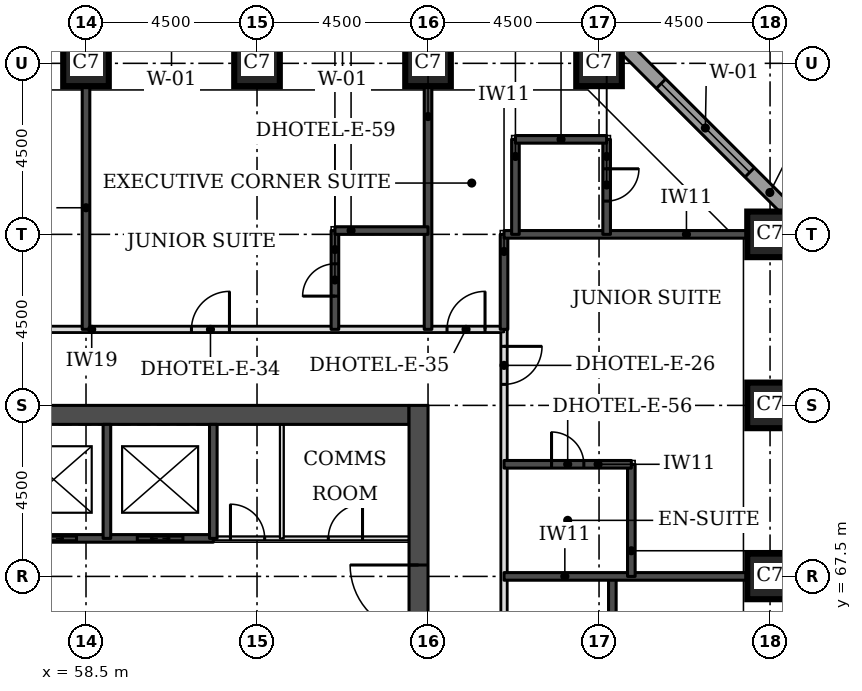
"""IFC4 building model, lengths in metres.
Left out: names, types, materials, properties, quantities, classifications, styles, units other than length and angle.
Written with IfcOpenShell. Run it as: python <this file> out.ifc"""

import sys

from ifc_helpers import new_model, si_unit, direction, frame, frame_2d, origin, origin_2d, place, context, subcontext, project, spatial, rectangle, extrude, element, fill, save


model = new_model("IFC4")
c1 = context("Model", 3, precision=1e-05, world=origin(), true_north=direction((0.0, 1.0)))
c2 = subcontext(c1, "Body", "Model", "MODEL_VIEW")
j1 = project(units=[si_unit("LENGTHUNIT", "METRE"), si_unit("PLANEANGLEUNIT", "RADIAN")], contexts=[c1])
p1 = place(None, origin())
s1 = spatial("IfcSite", under=j1, at=p1, CompositionType="ELEMENT")
p2 = place(p1, origin())
s2 = spatial("IfcBuilding", under=s1, at=p2, CompositionType="ELEMENT")
p3 = place(p2, frame((0.0, 0.0, 39.6)))
s3 = spatial("IfcBuildingStorey", under=s2, at=p3, CompositionType="ELEMENT", Elevation=39.6)
for number, where, z_axis, x_axis in (
    (1, (76.5, 67.5, 0.0), (0.0, 0.0, 1.0), (1.0, 0.0, 0.0)),
    (2, (76.5, 72.0, 0.0), (0.0, 0.0, 1.0), (1.0, 0.0, 0.0)),
    (3, (76.5, 76.5, 0.0), (0.0, 0.0, 1.0), (1.0, 0.0, 0.0)),
    (4, (58.5, 81.0, 0.0), (0.0, 0.0, 1.0), (1.0, 0.0, 0.0)),
    (5, (63.0, 81.0, 0.0), (0.0, 0.0, 1.0), (1.0, 0.0, 0.0)),
    (6, (67.5, 81.0, 0.0), (0.0, 0.0, 1.0), (1.0, 0.0, 0.0)),
    (7, (72.0, 81.0, 0.0), (0.0, 0.0, 1.0), (1.0, 0.0, 0.0)),
):
    element("IfcColumn", number, at=place(p3, frame(where, z_axis=z_axis, x_axis=x_axis)), inside=s3, PredefinedType="COLUMN", context=c2, shape_type="SweptSolid", body=[
        extrude(rectangle(XDim=1.2, YDim=1.2, at=origin_2d()), origin(), (0.0, 0.0, 1.0), 3.3),
    ])
p4 = place(p3, frame((45.5, 71.75, 0.0), z_axis=(0.0, 0.0, 1.0), x_axis=(1.0, 0.0, 0.0)))
e8 = element("IfcWall", 8, at=p4, inside=s3, PredefinedType="SHEAR", context=c2, shape_type="SweptSolid", body=[
    extrude(rectangle(XDim=21.5, YDim=0.5, at=frame_2d((10.75, 0.0))), origin(), (0.0, 0.0, 1.0), 3.3),
])
p5 = place(p3, frame((67.25, 49.5, 0.0), z_axis=(0.0, 0.0, 1.0), x_axis=(0.0, 1.0, 0.0)))
e9 = element("IfcWall", 9, at=p5, inside=s3, PredefinedType="SHEAR", context=c2, shape_type="SweptSolid", body=[
    extrude(rectangle(XDim=22.5, YDim=0.5, at=frame_2d((11.25, 0.0))), origin(), (0.0, 0.0, 1.0), 3.3),
])
p6 = place(p5, frame((4.2, 0.0, 0.0)))
e10 = element("IfcOpeningElement", 10, at=p6, cuts=e9, PredefinedType="OPENING", context=c2, shape_type="SweptSolid", body=[
    extrude(rectangle(XDim=1.8, YDim=2.1, at=frame_2d((0.9, 1.05))), frame((0.0, 0.26, 0.0), z_axis=(0.0, -1.0, 0.0), x_axis=(1.0, 0.0, 0.0)), (0.0, 0.0, 1.0), 0.52),
])
p7 = place(p5, frame((6.9, 0.0, 0.0)))
e11 = element("IfcOpeningElement", 11, at=p7, cuts=e9, PredefinedType="OPENING", context=c2, shape_type="SweptSolid", body=[
    extrude(rectangle(XDim=1.1, YDim=2.1, at=frame_2d((0.55, 1.05))), frame((0.0, 0.26, 0.0), z_axis=(0.0, -1.0, 0.0), x_axis=(1.0, 0.0, 0.0)), (0.0, 0.0, 1.0), 0.52),
])
p8 = place(p5, frame((13.6, 0.0, 0.0)))
e12 = element("IfcOpeningElement", 12, at=p8, cuts=e9, PredefinedType="OPENING", context=c2, shape_type="SweptSolid", body=[
    extrude(rectangle(XDim=1.1, YDim=2.1, at=frame_2d((0.55, 1.05))), frame((0.0, 0.26, 0.0), z_axis=(0.0, -1.0, 0.0), x_axis=(1.0, 0.0, 0.0)), (0.0, 0.0, 1.0), 0.52),
])
p9 = place(p5, frame((16.5, 0.0, 0.0)))
e13 = element("IfcOpeningElement", 13, at=p9, cuts=e9, PredefinedType="OPENING", context=c2, shape_type="SweptSolid", body=[
    extrude(rectangle(XDim=1.8, YDim=2.1, at=frame_2d((0.9, 1.05))), frame((0.0, 0.26, 0.0), z_axis=(0.0, -1.0, 0.0), x_axis=(1.0, 0.0, 0.0)), (0.0, 0.0, 1.0), 0.52),
])
p10 = place(p3, frame((77.326, 76.77, 0.0), z_axis=(0.0, 0.0, 1.0), x_axis=(-0.707106781187, 0.707106781187, 0.0)))
e14 = element("IfcWall", 14, at=p10, inside=s3, PredefinedType="STANDARD", context=c2, shape_type="SweptSolid", body=[
    extrude(rectangle(XDim=7.151, YDim=0.35, at=frame_2d((3.576, 0.0))), origin(), (0.0, 0.0, 1.0), 3.055),
])
p11 = place(p10, frame((1.926, 0.0, 0.8)))
e15 = element("IfcOpeningElement", 15, at=p11, cuts=e14, PredefinedType="OPENING", context=c2, shape_type="SweptSolid", body=[
    extrude(rectangle(XDim=3.3, YDim=1.5, at=frame_2d((1.65, 0.75))), frame((0.0, 0.185, 0.0), z_axis=(0.0, -1.0, 0.0), x_axis=(1.0, 0.0, 0.0)), (0.0, 0.0, 1.0), 0.37),
])
p12 = place(p3, frame((69.5, 47.5, 0.0), z_axis=(0.0, 0.0, 1.0), x_axis=(0.0, 1.0, 0.0)))
e16 = element("IfcWall", 16, at=p12, inside=s3, PredefinedType="PARTITIONING", context=c2, shape_type="SweptSolid", body=[
    extrude(rectangle(XDim=26.5, YDim=0.15, at=frame_2d((13.25, 0.0))), origin(), (0.0, 0.0, 1.0), 3.08),
])
p13 = place(p12, frame((25.053, 0.0, 0.0)))
e17 = element("IfcOpeningElement", 17, at=p13, cuts=e16, PredefinedType="OPENING", context=c2, shape_type="SweptSolid", body=[
    extrude(rectangle(XDim=1.0, YDim=2.1, at=frame_2d((0.5, 1.05))), frame((0.0, 0.085, 0.0), z_axis=(0.0, -1.0, 0.0), x_axis=(1.0, 0.0, 0.0)), (0.0, 0.0, 1.0), 0.17),
])
p14 = place(p12, frame((13.775, 0.0, 0.0)))
e18 = element("IfcOpeningElement", 18, at=p14, cuts=e16, PredefinedType="OPENING", context=c2, shape_type="SweptSolid", body=[
    extrude(rectangle(XDim=1.0, YDim=2.1, at=frame_2d((0.5, 1.05))), frame((0.0, 0.085, 0.0), z_axis=(0.0, -1.0, 0.0), x_axis=(1.0, 0.0, 0.0)), (0.0, 0.0, 1.0), 0.17),
])
p15 = place(p12, frame((7.65, 0.0, 0.0)))
e19 = element("IfcOpeningElement", 19, at=p15, cuts=e16, PredefinedType="OPENING", context=c2, shape_type="SweptSolid", body=[
    extrude(rectangle(XDim=1.1, YDim=2.1, at=frame_2d((0.55, 1.05))), frame((0.0, 0.085, 0.0), z_axis=(0.0, -1.0, 0.0), x_axis=(1.0, 0.0, 0.0)), (0.0, 0.0, 1.0), 0.17),
])
p16 = place(p12, frame((0.447, 0.0, 0.0)))
e20 = element("IfcOpeningElement", 20, at=p16, cuts=e16, PredefinedType="OPENING", context=c2, shape_type="SweptSolid", body=[
    extrude(rectangle(XDim=1.0, YDim=2.1, at=frame_2d((0.5, 1.05))), frame((0.0, 0.085, 0.0), z_axis=(0.0, -1.0, 0.0), x_axis=(1.0, 0.0, 0.0)), (0.0, 0.0, 1.0), 0.17),
])
p17 = place(p3, frame((43.0, 74.0, 0.0), z_axis=(0.0, 0.0, 1.0), x_axis=(1.0, 0.0, 0.0)))
e21 = element("IfcWall", 21, at=p17, inside=s3, PredefinedType="PARTITIONING", context=c2, shape_type="SweptSolid", body=[
    extrude(rectangle(XDim=26.5, YDim=0.15, at=frame_2d((13.25, 0.0))), origin(), (0.0, 0.0, 1.0), 3.08),
])
p18 = place(p17, frame((2.825, 0.0, 0.0)))
e22 = element("IfcOpeningElement", 22, at=p18, cuts=e21, PredefinedType="OPENING", context=c2, shape_type="SweptSolid", body=[
    extrude(rectangle(XDim=1.0, YDim=2.1, at=frame_2d((0.5, 1.05))), frame((0.0, 0.085, 0.0), z_axis=(0.0, -1.0, 0.0), x_axis=(1.0, 0.0, 0.0)), (0.0, 0.0, 1.0), 0.17),
])
p19 = place(p17, frame((11.975, 0.0, 0.0)))
e23 = element("IfcOpeningElement", 23, at=p19, cuts=e21, PredefinedType="OPENING", context=c2, shape_type="SweptSolid", body=[
    extrude(rectangle(XDim=1.0, YDim=2.1, at=frame_2d((0.5, 1.05))), frame((0.0, 0.085, 0.0), z_axis=(0.0, -1.0, 0.0), x_axis=(1.0, 0.0, 0.0)), (0.0, 0.0, 1.0), 0.17),
])
p20 = place(p17, frame((18.275, 0.0, 0.0)))
e24 = element("IfcOpeningElement", 24, at=p20, cuts=e21, PredefinedType="OPENING", context=c2, shape_type="SweptSolid", body=[
    extrude(rectangle(XDim=1.0, YDim=2.1, at=frame_2d((0.5, 1.05))), frame((0.0, 0.085, 0.0), z_axis=(0.0, -1.0, 0.0), x_axis=(1.0, 0.0, 0.0)), (0.0, 0.0, 1.0), 0.17),
])
p21 = place(p17, frame((0.5, 0.0, 0.0)))
e25 = element("IfcOpeningElement", 25, at=p21, cuts=e21, PredefinedType="OPENING", context=c2, shape_type="SweptSolid", body=[
    extrude(rectangle(XDim=1.0, YDim=2.1, at=frame_2d((0.5, 1.05))), frame((0.0, 0.085, 0.0), z_axis=(0.0, -1.0, 0.0), x_axis=(1.0, 0.0, 0.0)), (0.0, 0.0, 1.0), 0.17),
])
p22 = place(p17, frame((25.0, 0.0, 0.0)))
e26 = element("IfcOpeningElement", 26, at=p22, cuts=e21, PredefinedType="OPENING", context=c2, shape_type="SweptSolid", body=[
    extrude(rectangle(XDim=1.0, YDim=2.1, at=frame_2d((0.5, 1.05))), frame((0.0, 0.085, 0.0), z_axis=(0.0, -1.0, 0.0), x_axis=(1.0, 0.0, 0.0)), (0.0, 0.0, 1.0), 0.17),
])
p23 = place(p3, frame((72.35, 65.05, 0.0), z_axis=(0.0, 0.0, 1.0), x_axis=(0.0, 1.0, 0.0)))
e27 = element("IfcWall", 27, at=p23, inside=s3, PredefinedType="SOLIDWALL", context=c2, shape_type="SweptSolid", body=[
    extrude(rectangle(XDim=2.45, YDim=0.2, at=frame_2d((1.225, 0.0))), origin(), (0.0, 0.0, 1.0), 3.08),
])
p24 = place(p3, frame((69.5, 67.5, 0.0), z_axis=(0.0, 0.0, 1.0), x_axis=(1.0, 0.0, 0.0)))
e28 = element("IfcWall", 28, at=p24, inside=s3, PredefinedType="SOLIDWALL", context=c2, shape_type="SweptSolid", body=[
    extrude(rectangle(XDim=6.4, YDim=0.2, at=frame_2d((3.2, 0.0))), origin(), (0.0, 0.0, 1.0), 3.08),
])
p25 = place(p3, frame((72.85, 67.5, 0.0), z_axis=(0.0, 0.0, 1.0), x_axis=(0.0, 1.0, 0.0)))
e29 = element("IfcWall", 29, at=p25, inside=s3, PredefinedType="SOLIDWALL", context=c2, shape_type="SweptSolid", body=[
    extrude(rectangle(XDim=2.95, YDim=0.2, at=frame_2d((1.475, 0.0))), origin(), (0.0, 0.0, 1.0), 3.08),
])
p26 = place(p3, frame((69.5, 70.45, 0.0), z_axis=(0.0, 0.0, 1.0), x_axis=(1.0, 0.0, 0.0)))
e30 = element("IfcWall", 30, at=p26, inside=s3, PredefinedType="SOLIDWALL", context=c2, shape_type="SweptSolid", body=[
    extrude(rectangle(XDim=3.35, YDim=0.2, at=frame_2d((1.675, 0.0))), origin(), (0.0, 0.0, 1.0), 3.08),
])
p27 = place(p26, frame((1.25, 0.0, 0.0)))
e31 = element("IfcOpeningElement", 31, at=p27, cuts=e30, PredefinedType="OPENING", context=c2, shape_type="SweptSolid", body=[
    extrude(rectangle(XDim=0.85, YDim=2.1, at=frame_2d((0.425, 1.05))), frame((0.0, 0.11, 0.0), z_axis=(0.0, -1.0, 0.0), x_axis=(1.0, 0.0, 0.0)), (0.0, 0.0, 1.0), 0.22),
])
p28 = place(p3, frame((58.5, 74.0, 0.0), z_axis=(0.0, 0.0, 1.0), x_axis=(0.0, 1.0, 0.0)))
e32 = element("IfcWall", 32, at=p28, inside=s3, PredefinedType="SOLIDWALL", context=c2, shape_type="SweptSolid", body=[
    extrude(rectangle(XDim=6.4, YDim=0.2, at=frame_2d((3.2, 0.0))), origin(), (0.0, 0.0, 1.0), 3.08),
])
p29 = place(p3, frame((65.05, 74.0, 0.0), z_axis=(0.0, 0.0, 1.0), x_axis=(0.0, 1.0, 0.0)))
e33 = element("IfcWall", 33, at=p29, inside=s3, PredefinedType="SOLIDWALL", context=c2, shape_type="SweptSolid", body=[
    extrude(rectangle(XDim=2.6, YDim=0.2, at=frame_2d((1.3, 0.0))), origin(), (0.0, 0.0, 1.0), 3.08),
])
p30 = place(p29, frame((0.875, 0.0, 0.0)))
e34 = element("IfcOpeningElement", 34, at=p30, cuts=e33, PredefinedType="OPENING", context=c2, shape_type="SweptSolid", body=[
    extrude(rectangle(XDim=0.85, YDim=2.1, at=frame_2d((0.425, 1.05))), frame((0.0, 0.11, 0.0), z_axis=(0.0, -1.0, 0.0), x_axis=(1.0, 0.0, 0.0)), (0.0, 0.0, 1.0), 0.22),
])
p31 = place(p3, frame((67.5, 74.0, 0.0), z_axis=(0.0, 0.0, 1.0), x_axis=(0.0, 1.0, 0.0)))
e35 = element("IfcWall", 35, at=p31, inside=s3, PredefinedType="SOLIDWALL", context=c2, shape_type="SweptSolid", body=[
    extrude(rectangle(XDim=6.4, YDim=0.2, at=frame_2d((3.2, 0.0))), origin(), (0.0, 0.0, 1.0), 3.08),
])
p32 = place(p3, frame((69.5, 74.0, 0.0), z_axis=(0.0, 0.0, 1.0), x_axis=(0.0, 1.0, 0.0)))
e36 = element("IfcWall", 36, at=p32, inside=s3, PredefinedType="SOLIDWALL", context=c2, shape_type="SweptSolid", body=[
    extrude(rectangle(XDim=2.5, YDim=0.2, at=frame_2d((1.25, 0.0))), origin(), (0.0, 0.0, 1.0), 3.08),
])
p33 = place(p3, frame((69.5, 76.5, 0.0), z_axis=(0.0, 0.0, 1.0), x_axis=(1.0, 0.0, 0.0)))
e37 = element("IfcWall", 37, at=p33, inside=s3, PredefinedType="SOLIDWALL", context=c2, shape_type="SweptSolid", body=[
    extrude(rectangle(XDim=6.4, YDim=0.2, at=frame_2d((3.2, 0.0))), origin(), (0.0, 0.0, 1.0), 3.08),
])
p34 = place(p3, frame((69.8, 76.5, 0.0), z_axis=(0.0, 0.0, 1.0), x_axis=(0.0, 1.0, 0.0)))
e38 = element("IfcWall", 38, at=p34, inside=s3, PredefinedType="SOLIDWALL", context=c2, shape_type="SweptSolid", body=[
    extrude(rectangle(XDim=2.5, YDim=0.2, at=frame_2d((1.25, 0.0))), origin(), (0.0, 0.0, 1.0), 3.08),
])
p35 = place(p3, frame((72.2, 76.5, 0.0), z_axis=(0.0, 0.0, 1.0), x_axis=(0.0, 1.0, 0.0)))
e39 = element("IfcWall", 39, at=p35, inside=s3, PredefinedType="SOLIDWALL", context=c2, shape_type="SweptSolid", body=[
    extrude(rectangle(XDim=2.5, YDim=0.2, at=frame_2d((1.25, 0.0))), origin(), (0.0, 0.0, 1.0), 3.08),
])
p36 = place(p35, frame((0.875, 0.0, 0.0)))
e40 = element("IfcOpeningElement", 40, at=p36, cuts=e39, PredefinedType="OPENING", context=c2, shape_type="SweptSolid", body=[
    extrude(rectangle(XDim=0.85, YDim=2.1, at=frame_2d((0.425, 1.05))), frame((0.0, 0.11, 0.0), z_axis=(0.0, -1.0, 0.0), x_axis=(1.0, 0.0, 0.0)), (0.0, 0.0, 1.0), 0.22),
])
p37 = place(p3, frame((65.05, 76.6, 0.0), z_axis=(0.0, 0.0, 1.0), x_axis=(1.0, 0.0, 0.0)))
e41 = element("IfcWall", 41, at=p37, inside=s3, PredefinedType="SOLIDWALL", context=c2, shape_type="SweptSolid", body=[
    extrude(rectangle(XDim=2.45, YDim=0.2, at=frame_2d((1.225, 0.0))), origin(), (0.0, 0.0, 1.0), 3.08),
])
p38 = place(p3, frame((69.8, 79.0, 0.0), z_axis=(0.0, 0.0, 1.0), x_axis=(1.0, 0.0, 0.0)))
e42 = element("IfcWall", 42, at=p38, inside=s3, PredefinedType="SOLIDWALL", context=c2, shape_type="SweptSolid", body=[
    extrude(rectangle(XDim=2.4, YDim=0.2, at=frame_2d((1.2, 0.0))), origin(), (0.0, 0.0, 1.0), 3.08),
])
p39 = place(p3, frame((61.85, 68.5, 0.0), z_axis=(0.0, 0.0, 1.0), x_axis=(1.0, 0.0, 0.0)))
e43 = element("IfcWall", 43, at=p39, inside=s3, PredefinedType="PARTITIONING", context=c2, shape_type="SweptSolid", body=[
    extrude(rectangle(XDim=5.15, YDim=0.1, at=frame_2d((2.575, 0.0))), origin(), (0.0, 0.0, 1.0), 3.08),
])
p40 = place(p39, frame((3.026, 0.0, 0.0)))
e44 = element("IfcOpeningElement", 44, at=p40, cuts=e43, PredefinedType="OPENING", context=c2, shape_type="SweptSolid", body=[
    extrude(rectangle(XDim=0.9, YDim=2.1, at=frame_2d((0.45, 1.05))), frame((0.0, 0.06, 0.0), z_axis=(0.0, -1.0, 0.0), x_axis=(1.0, 0.0, 0.0)), (0.0, 0.0, 1.0), 0.12),
])
p41 = place(p39, frame((0.451, 0.0, 0.0)))
e45 = element("IfcOpeningElement", 45, at=p41, cuts=e43, PredefinedType="OPENING", context=c2, shape_type="SweptSolid", body=[
    extrude(rectangle(XDim=0.9, YDim=2.1, at=frame_2d((0.45, 1.05))), frame((0.0, 0.06, 0.0), z_axis=(0.0, -1.0, 0.0), x_axis=(1.0, 0.0, 0.0)), (0.0, 0.0, 1.0), 0.12),
])
p42 = place(p3, frame((50.65, 68.5, 0.0), z_axis=(0.0, 0.0, 1.0), x_axis=(1.0, 0.0, 0.0)))
e46 = element("IfcWall", 46, at=p42, inside=s3, PredefinedType="SOLIDWALL", context=c2, shape_type="SweptSolid", body=[
    extrude(rectangle(XDim=11.2, YDim=0.2, at=frame_2d((5.6, 0.0))), origin(), (0.0, 0.0, 1.0), 3.08),
])
p43 = place(p42, frame((0.8, 0.0, 0.0)))
e47 = element("IfcOpeningElement", 47, at=p43, cuts=e46, PredefinedType="OPENING", context=c2, shape_type="SweptSolid", body=[
    extrude(rectangle(XDim=1.2, YDim=2.1, at=frame_2d((0.6, 1.05))), frame((0.0, 0.11, 0.0), z_axis=(0.0, -1.0, 0.0), x_axis=(1.0, 0.0, 0.0)), (0.0, 0.0, 1.0), 0.22),
])
p44 = place(p42, frame((3.6, 0.0, 0.0)))
e48 = element("IfcOpeningElement", 48, at=p44, cuts=e46, PredefinedType="OPENING", context=c2, shape_type="SweptSolid", body=[
    extrude(rectangle(XDim=1.2, YDim=2.1, at=frame_2d((0.6, 1.05))), frame((0.0, 0.11, 0.0), z_axis=(0.0, -1.0, 0.0), x_axis=(1.0, 0.0, 0.0)), (0.0, 0.0, 1.0), 0.22),
])
p45 = place(p42, frame((6.4, 0.0, 0.0)))
e49 = element("IfcOpeningElement", 49, at=p45, cuts=e46, PredefinedType="OPENING", context=c2, shape_type="SweptSolid", body=[
    extrude(rectangle(XDim=1.2, YDim=2.1, at=frame_2d((0.6, 1.05))), frame((0.0, 0.11, 0.0), z_axis=(0.0, -1.0, 0.0), x_axis=(1.0, 0.0, 0.0)), (0.0, 0.0, 1.0), 0.22),
])
p46 = place(p42, frame((9.2, 0.0, 0.0)))
e50 = element("IfcOpeningElement", 50, at=p46, cuts=e46, PredefinedType="OPENING", context=c2, shape_type="SweptSolid", body=[
    extrude(rectangle(XDim=1.2, YDim=2.1, at=frame_2d((0.6, 1.05))), frame((0.0, 0.11, 0.0), z_axis=(0.0, -1.0, 0.0), x_axis=(1.0, 0.0, 0.0)), (0.0, 0.0, 1.0), 0.22),
])
for number, where, z_axis, x_axis in (
    (51, (59.05, 68.5, 0.0), (0.0, 0.0, 1.0), (0.0, 1.0, 0.0)),
    (52, (61.85, 68.5, 0.0), (0.0, 0.0, 1.0), (0.0, 1.0, 0.0)),
):
    element("IfcWall", number, at=place(p3, frame(where, z_axis=z_axis, x_axis=x_axis)), inside=s3, PredefinedType="SOLIDWALL", context=c2, shape_type="SweptSolid", body=[
        extrude(rectangle(XDim=3.0, YDim=0.2, at=frame_2d((1.5, 0.0))), origin(), (0.0, 0.0, 1.0), 3.08),
    ])
p47 = place(p3, frame((63.653, 68.5, 0.0), z_axis=(0.0, 0.0, 1.0), x_axis=(0.0, 1.0, 0.0)))
e53 = element("IfcWall", 53, at=p47, inside=s3, PredefinedType="PARTITIONING", context=c2, shape_type="SweptSolid", body=[
    extrude(rectangle(XDim=3.0, YDim=0.1, at=frame_2d((1.5, 0.0))), origin(), (0.0, 0.0, 1.0), 3.08),
])
p48 = place(p11, origin())
e54 = element("IfcWindow", 54, at=p48, inside=s3, PartitioningType="SINGLE_PANEL", PredefinedType="WINDOW", context=c2, shape_type="SweptSolid", body=[
    extrude(rectangle(XDim=3.3, YDim=1.5, at=frame_2d((1.65, 0.75))), frame((0.0, 0.085, 0.0), z_axis=(0.0, -1.0, 0.0), x_axis=(1.0, 0.0, 0.0)), (0.0, 0.0, 1.0), 0.06),
])
fill(e15, e54)
p49 = place(p20, origin())
e55 = element("IfcDoor", 55, at=p49, inside=s3, OperationType="SINGLE_SWING_RIGHT", PredefinedType="DOOR", context=c2, shape_type="SweptSolid", body=[
    extrude(rectangle(XDim=1.0, YDim=2.1, at=frame_2d((0.5, 1.05))), frame((0.0, 0.025, 0.0), z_axis=(0.0, -1.0, 0.0), x_axis=(1.0, 0.0, 0.0)), (0.0, 0.0, 1.0), 0.05),
])
fill(e24, e55)
p50 = place(p30, origin())
e56 = element("IfcDoor", 56, at=p50, inside=s3, OperationType="SINGLE_SWING_LEFT", PredefinedType="DOOR", context=c2, shape_type="SweptSolid", body=[
    extrude(rectangle(XDim=0.85, YDim=2.1, at=frame_2d((0.425, 1.05))), frame((0.0, 0.025, 0.0), z_axis=(0.0, -1.0, 0.0), x_axis=(1.0, 0.0, 0.0)), (0.0, 0.0, 1.0), 0.05),
])
fill(e34, e56)
p51 = place(p13, frame((1.0, 0.0, 0.0), z_axis=(0.0, 0.0, 1.0), x_axis=(-1.0, 0.0, 0.0)))
e57 = element("IfcDoor", 57, at=p51, inside=s3, OperationType="SINGLE_SWING_LEFT", PredefinedType="DOOR", context=c2, shape_type="SweptSolid", body=[
    extrude(rectangle(XDim=1.0, YDim=2.1, at=frame_2d((0.5, 1.05))), frame((0.0, 0.025, 0.0), z_axis=(0.0, -1.0, 0.0), x_axis=(1.0, 0.0, 0.0)), (0.0, 0.0, 1.0), 0.05),
])
fill(e17, e57)
p52 = place(p27, origin())
e58 = element("IfcDoor", 58, at=p52, inside=s3, OperationType="SINGLE_SWING_LEFT", PredefinedType="DOOR", context=c2, shape_type="SweptSolid", body=[
    extrude(rectangle(XDim=0.85, YDim=2.1, at=frame_2d((0.425, 1.05))), frame((0.0, 0.025, 0.0), z_axis=(0.0, -1.0, 0.0), x_axis=(1.0, 0.0, 0.0)), (0.0, 0.0, 1.0), 0.05),
])
fill(e31, e58)
p53 = place(p22, origin())
e59 = element("IfcDoor", 59, at=p53, inside=s3, OperationType="SINGLE_SWING_RIGHT", PredefinedType="DOOR", context=c2, shape_type="SweptSolid", body=[
    extrude(rectangle(XDim=1.0, YDim=2.1, at=frame_2d((0.5, 1.05))), frame((0.0, 0.025, 0.0), z_axis=(0.0, -1.0, 0.0), x_axis=(1.0, 0.0, 0.0)), (0.0, 0.0, 1.0), 0.05),
])
fill(e26, e59)
p54 = place(p36, frame((0.85, 0.0, 0.0), z_axis=(0.0, 0.0, 1.0), x_axis=(-1.0, 0.0, 0.0)))
e60 = element("IfcDoor", 60, at=p54, inside=s3, OperationType="SINGLE_SWING_LEFT", PredefinedType="DOOR", context=c2, shape_type="SweptSolid", body=[
    extrude(rectangle(XDim=0.85, YDim=2.1, at=frame_2d((0.425, 1.05))), frame((0.0, 0.025, 0.0), z_axis=(0.0, -1.0, 0.0), x_axis=(1.0, 0.0, 0.0)), (0.0, 0.0, 1.0), 0.05),
])
fill(e40, e60)
p55 = place(p45, origin())
e61 = element("IfcDoor", 61, at=p55, inside=s3, OperationType="DOUBLE_DOOR_SLIDING", PredefinedType="DOOR", context=c2, shape_type="SweptSolid", body=[
    extrude(rectangle(XDim=1.2, YDim=2.1, at=frame_2d((0.6, 1.05))), frame((0.0, 0.025, 0.0), z_axis=(0.0, -1.0, 0.0), x_axis=(1.0, 0.0, 0.0)), (0.0, 0.0, 1.0), 0.05),
])
fill(e49, e61)
p56 = place(p46, origin())
e62 = element("IfcDoor", 62, at=p56, inside=s3, OperationType="DOUBLE_DOOR_SLIDING", PredefinedType="DOOR", context=c2, shape_type="SweptSolid", body=[
    extrude(rectangle(XDim=1.2, YDim=2.1, at=frame_2d((0.6, 1.05))), frame((0.0, 0.025, 0.0), z_axis=(0.0, -1.0, 0.0), x_axis=(1.0, 0.0, 0.0)), (0.0, 0.0, 1.0), 0.05),
])
fill(e50, e62)
p57 = place(p9, origin())
e63 = element("IfcDoor", 63, at=p57, inside=s3, OperationType="SINGLE_SWING_RIGHT", PredefinedType="DOOR", context=c2, shape_type="SweptSolid", body=[
    extrude(rectangle(XDim=1.8, YDim=2.1, at=frame_2d((0.9, 1.05))), frame((0.0, 0.025, 0.0), z_axis=(0.0, -1.0, 0.0), x_axis=(1.0, 0.0, 0.0)), (0.0, 0.0, 1.0), 0.05),
])
fill(e13, e63)
p58 = place(p40, origin())
e64 = element("IfcDoor", 64, at=p58, inside=s3, OperationType="SINGLE_SWING_RIGHT", PredefinedType="DOOR", context=c2, shape_type="SweptSolid", body=[
    extrude(rectangle(XDim=0.9, YDim=2.1, at=frame_2d((0.45, 1.05))), frame((0.0, 0.025, 0.0), z_axis=(0.0, -1.0, 0.0), x_axis=(1.0, 0.0, 0.0)), (0.0, 0.0, 1.0), 0.05),
])
fill(e44, e64)
p59 = place(p41, origin())
e65 = element("IfcDoor", 65, at=p59, inside=s3, OperationType="SINGLE_SWING_LEFT", PredefinedType="DOOR", context=c2, shape_type="SweptSolid", body=[
    extrude(rectangle(XDim=0.9, YDim=2.1, at=frame_2d((0.45, 1.05))), frame((0.0, 0.025, 0.0), z_axis=(0.0, -1.0, 0.0), x_axis=(1.0, 0.0, 0.0)), (0.0, 0.0, 1.0), 0.05),
])
fill(e45, e65)
save(model, sys.argv[1])
